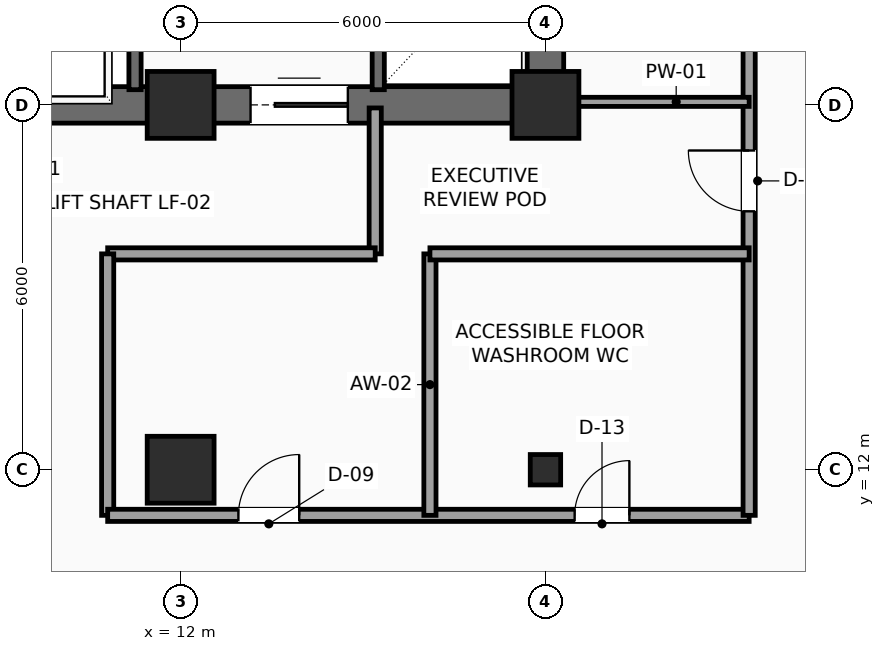
"""IFC4 building model, lengths in metres.
Left out: names, types, materials, properties, quantities, classifications, styles, units other than length and angle.
Written with IfcOpenShell. Run it as: python <this file> out.ifc"""

import sys

from ifc_helpers import new_model, si_unit, direction, frame, frame_2d, origin, origin_2d, place, context, subcontext, project, spatial, rectangle, hollow_rectangle, extrude, element, fill, save


model = new_model("IFC4")
c1 = context("Model", 3, precision=1e-05, world=origin(), true_north=direction((0.0, 1.0)))
c2 = subcontext(c1, "Body", "Model", "MODEL_VIEW")
j1 = project(units=[si_unit("LENGTHUNIT", "METRE"), si_unit("PLANEANGLEUNIT", "RADIAN")], contexts=[c1])
p1 = place(None, origin())
s1 = spatial("IfcSite", under=j1, at=p1, CompositionType="ELEMENT")
p2 = place(p1, origin())
s2 = spatial("IfcBuilding", under=s1, at=p2, CompositionType="ELEMENT")
p3 = place(p2, frame((0.0, 0.0, 119.4)))
s3 = spatial("IfcBuildingStorey", under=s2, at=p3, CompositionType="ELEMENT", Elevation=119.4)
for number, where, z_axis, x_axis in (
    (1, (12.0, 18.0, 0.0), (0.0, 0.0, 1.0), (1.0, 0.0, 0.0)),
    (2, (18.0, 18.0, 0.0), (0.0, 0.0, 1.0), (1.0, 0.0, 0.0)),
    (3, (12.0, 12.0, 0.0), (0.0, 0.0, 1.0), (1.0, 0.0, 0.0)),
):
    element("IfcColumn", number, at=place(p3, frame(where, z_axis=z_axis, x_axis=x_axis)), inside=s3, PredefinedType="COLUMN", context=c2, shape_type="SweptSolid", body=[
        extrude(rectangle(XDim=1.1, YDim=1.1, at=origin_2d()), origin(), (0.0, 0.0, 1.0), 3.75),
    ])
p4 = place(p3, frame((18.0, 12.0, 0.0), z_axis=(0.0, 0.0, 1.0), x_axis=(1.0, 0.0, 0.0)))
e4 = element("IfcColumn", 4, at=p4, inside=s3, PredefinedType="COLUMN", context=c2, shape_type="SweptSolid", body=[
    extrude(hollow_rectangle(XDim=0.5, YDim=0.5, WallThickness=0.025, InnerFilletRadius=0.025, OuterFilletRadius=0.04, at=origin_2d()), origin(), (0.0, 0.0, 1.0), 3.75),
])
p5 = place(p3, frame((6.0, 18.0, 0.0), z_axis=(0.0, 0.0, 1.0), x_axis=(1.0, 0.0, 0.0)))
e5 = element("IfcWall", 5, at=p5, inside=s3, PredefinedType="SHEAR", context=c2, shape_type="SweptSolid", body=[
    extrude(rectangle(XDim=12.0, YDim=0.6, at=frame_2d((6.0, 0.0))), origin(), (0.0, 0.0, 1.0), 3.525),
])
p6 = place(p5, frame((7.15, 0.0, 0.0)))
e6 = element("IfcOpeningElement", 6, at=p6, cuts=e5, PredefinedType="OPENING", context=c2, shape_type="SweptSolid", body=[
    extrude(rectangle(XDim=1.6, YDim=2.3, at=frame_2d((0.8, 1.15))), frame((0.0, 0.31, 0.0), z_axis=(0.0, -1.0, 0.0), x_axis=(1.0, 0.0, 0.0)), (0.0, 0.0, 1.0), 0.62),
])
p7 = place(p3, frame((18.0, 18.0, 0.0), z_axis=(0.0, 0.0, 1.0), x_axis=(0.0, 1.0, 0.0)))
e7 = element("IfcWall", 7, at=p7, inside=s3, PredefinedType="SHEAR", context=c2, shape_type="SweptSolid", body=[
    extrude(rectangle(XDim=9.6, YDim=0.6, at=frame_2d((4.8, 0.0))), origin(), (0.0, 0.0, 1.0), 3.525),
])
p8 = place(p3, frame((11.25, 18.25, 0.0), z_axis=(0.0, 0.0, 1.0), x_axis=(0.0, 1.0, 0.0)))
e8 = element("IfcWall", 8, at=p8, inside=s3, PredefinedType="SHEAR", context=c2, shape_type="SweptSolid", body=[
    extrude(rectangle(XDim=2.17, YDim=0.2, at=frame_2d((1.085, 0.0))), origin(), (0.0, 0.0, 1.0), 3.525),
])
p9 = place(p3, frame((15.25, 18.25, 0.0), z_axis=(0.0, 0.0, 1.0), x_axis=(0.0, 1.0, 0.0)))
e9 = element("IfcWall", 9, at=p9, inside=s3, PredefinedType="SHEAR", context=c2, shape_type="SweptSolid", body=[
    extrude(rectangle(XDim=5.2, YDim=0.2, at=frame_2d((2.6, 0.0))), origin(), (0.0, 0.0, 1.0), 3.525),
])
p10 = place(p3, frame((15.2, 17.95, 0.0), z_axis=(0.0, 0.0, 1.0), x_axis=(0.0, -1.0, 0.0)))
e10 = element("IfcWall", 10, at=p10, inside=s3, PredefinedType="SOLIDWALL", context=c2, shape_type="SweptSolid", body=[
    extrude(rectangle(XDim=2.4, YDim=0.2, at=frame_2d((1.2, 0.0))), origin(), (0.0, 0.0, 1.0), 3.525),
])
p11 = place(p3, frame((15.2, 15.55, 0.0), z_axis=(0.0, 0.0, 1.0), x_axis=(-1.0, 0.0, 0.0)))
e11 = element("IfcWall", 11, at=p11, inside=s3, PredefinedType="SOLIDWALL", context=c2, shape_type="SweptSolid", body=[
    extrude(rectangle(XDim=4.4, YDim=0.2, at=frame_2d((2.2, 0.0))), origin(), (0.0, 0.0, 1.0), 3.525),
])
p12 = place(p3, frame((10.8, 15.55, 0.0), z_axis=(0.0, 0.0, 1.0), x_axis=(0.0, -1.0, 0.0)))
e12 = element("IfcWall", 12, at=p12, inside=s3, PredefinedType="SOLIDWALL", context=c2, shape_type="SweptSolid", body=[
    extrude(rectangle(XDim=4.3, YDim=0.2, at=frame_2d((2.15, 0.0))), origin(), (0.0, 0.0, 1.0), 3.525),
])
p13 = place(p3, frame((10.8, 11.25, 0.0), z_axis=(0.0, 0.0, 1.0), x_axis=(1.0, 0.0, 0.0)))
e13 = element("IfcWall", 13, at=p13, inside=s3, PredefinedType="SOLIDWALL", context=c2, shape_type="SweptSolid", body=[
    extrude(rectangle(XDim=10.55, YDim=0.2, at=frame_2d((5.275, 0.0))), origin(), (0.0, 0.0, 1.0), 3.525),
])
p14 = place(p13, frame((2.15, 0.0, 0.0)))
e14 = element("IfcOpeningElement", 14, at=p14, cuts=e13, PredefinedType="OPENING", context=c2, shape_type="SweptSolid", body=[
    extrude(rectangle(XDim=1.0, YDim=2.2, at=frame_2d((0.5, 1.1))), frame((0.0, 0.11, 0.0), z_axis=(0.0, -1.0, 0.0), x_axis=(1.0, 0.0, 0.0)), (0.0, 0.0, 1.0), 0.22),
])
p15 = place(p13, frame((7.68, 0.0, 0.0)))
e15 = element("IfcOpeningElement", 15, at=p15, cuts=e13, PredefinedType="OPENING", context=c2, shape_type="SweptSolid", body=[
    extrude(rectangle(XDim=0.9, YDim=2.1, at=frame_2d((0.45, 1.05))), frame((0.0, 0.11, 0.0), z_axis=(0.0, -1.0, 0.0), x_axis=(1.0, 0.0, 0.0)), (0.0, 0.0, 1.0), 0.22),
])
p16 = place(p3, frame((21.35, 11.25, 0.0), z_axis=(0.0, 0.0, 1.0), x_axis=(0.0, 1.0, 0.0)))
e16 = element("IfcWall", 16, at=p16, inside=s3, PredefinedType="SOLIDWALL", context=c2, shape_type="SweptSolid", body=[
    extrude(rectangle(XDim=19.0, YDim=0.2, at=frame_2d((9.5, 0.0))), origin(), (0.0, 0.0, 1.0), 3.525),
])
p17 = place(p16, frame((8.7, 0.0, 0.0)))
e17 = element("IfcOpeningElement", 17, at=p17, cuts=e16, PredefinedType="OPENING", context=c2, shape_type="SweptSolid", body=[
    extrude(rectangle(XDim=0.95, YDim=2.15, at=frame_2d((0.475, 1.075))), frame((0.0, 0.11, 0.0), z_axis=(0.0, -1.0, 0.0), x_axis=(1.0, 0.0, 0.0)), (0.0, 0.0, 1.0), 0.22),
])
p18 = place(p16, frame((13.475, 0.0, 0.0)))
e18 = element("IfcOpeningElement", 18, at=p18, cuts=e16, PredefinedType="OPENING", context=c2, shape_type="SweptSolid", body=[
    extrude(rectangle(XDim=0.9, YDim=2.1, at=frame_2d((0.45, 1.05))), frame((0.0, 0.11, 0.0), z_axis=(0.0, -1.0, 0.0), x_axis=(1.0, 0.0, 0.0)), (0.0, 0.0, 1.0), 0.22),
])
p19 = place(p16, frame((5.0, 0.0, 0.0)))
e19 = element("IfcOpeningElement", 19, at=p19, cuts=e16, PredefinedType="OPENING", context=c2, shape_type="SweptSolid", body=[
    extrude(rectangle(XDim=1.0, YDim=2.2, at=frame_2d((0.5, 1.1))), frame((0.0, 0.11, 0.0), z_axis=(0.0, -1.0, 0.0), x_axis=(1.0, 0.0, 0.0)), (0.0, 0.0, 1.0), 0.22),
])
p20 = place(p3, frame((16.1, 11.25, 0.0), z_axis=(0.0, 0.0, 1.0), x_axis=(0.0, 1.0, 0.0)))
e20 = element("IfcWall", 20, at=p20, inside=s3, PredefinedType="PARTITIONING", context=c2, shape_type="SweptSolid", body=[
    extrude(rectangle(XDim=4.3, YDim=0.2, at=frame_2d((2.15, 0.0))), origin(), (0.0, 0.0, 1.0), 3.525),
])
p21 = place(p3, frame((16.1, 15.55, 0.0), z_axis=(0.0, 0.0, 1.0), x_axis=(1.0, 0.0, 0.0)))
e21 = element("IfcWall", 21, at=p21, inside=s3, PredefinedType="PARTITIONING", context=c2, shape_type="SweptSolid", body=[
    extrude(rectangle(XDim=5.25, YDim=0.2, at=frame_2d((2.625, 0.0))), origin(), (0.0, 0.0, 1.0), 3.525),
])
p22 = place(p3, frame((18.1, 18.05, 0.0), z_axis=(0.0, 0.0, 1.0), x_axis=(1.0, 0.0, 0.0)))
e22 = element("IfcWall", 22, at=p22, inside=s3, PredefinedType="PARTITIONING", context=c2, shape_type="SweptSolid", body=[
    extrude(rectangle(XDim=3.25, YDim=0.15, at=frame_2d((1.625, 0.0))), origin(), (0.0, 0.0, 1.0), 3.017),
])
p23 = place(p6, origin())
e23 = element("IfcDoor", 23, at=p23, inside=s3, OperationType="DOUBLE_DOOR_SLIDING", PredefinedType="DOOR", context=c2, shape_type="SweptSolid", body=[
    extrude(rectangle(XDim=1.6, YDim=2.3, at=frame_2d((0.8, 1.15))), frame((0.0, 0.025, 0.0), z_axis=(0.0, -1.0, 0.0), x_axis=(1.0, 0.0, 0.0)), (0.0, 0.0, 1.0), 0.05),
])
fill(e6, e23)
p24 = place(p14, origin())
e24 = element("IfcDoor", 24, at=p24, inside=s3, OperationType="SINGLE_SWING_RIGHT", PredefinedType="DOOR", context=c2, shape_type="SweptSolid", body=[
    extrude(rectangle(XDim=1.0, YDim=2.2, at=frame_2d((0.5, 1.1))), frame((0.0, 0.025, 0.0), z_axis=(0.0, -1.0, 0.0), x_axis=(1.0, 0.0, 0.0)), (0.0, 0.0, 1.0), 0.05),
])
fill(e14, e24)
p25 = place(p15, origin())
e25 = element("IfcDoor", 25, at=p25, inside=s3, OperationType="SINGLE_SWING_RIGHT", PredefinedType="DOOR", context=c2, shape_type="SweptSolid", body=[
    extrude(rectangle(XDim=0.9, YDim=2.1, at=frame_2d((0.45, 1.05))), frame((0.0, 0.025, 0.0), z_axis=(0.0, -1.0, 0.0), x_axis=(1.0, 0.0, 0.0)), (0.0, 0.0, 1.0), 0.05),
])
fill(e15, e25)
p26 = place(p19, origin())
e26 = element("IfcDoor", 26, at=p26, inside=s3, OperationType="SINGLE_SWING_RIGHT", PredefinedType="DOOR", context=c2, shape_type="SweptSolid", body=[
    extrude(rectangle(XDim=1.0, YDim=2.2, at=frame_2d((0.5, 1.1))), frame((0.0, 0.025, 0.0), z_axis=(0.0, -1.0, 0.0), x_axis=(1.0, 0.0, 0.0)), (0.0, 0.0, 1.0), 0.05),
])
fill(e19, e26)
save(model, sys.argv[1])
